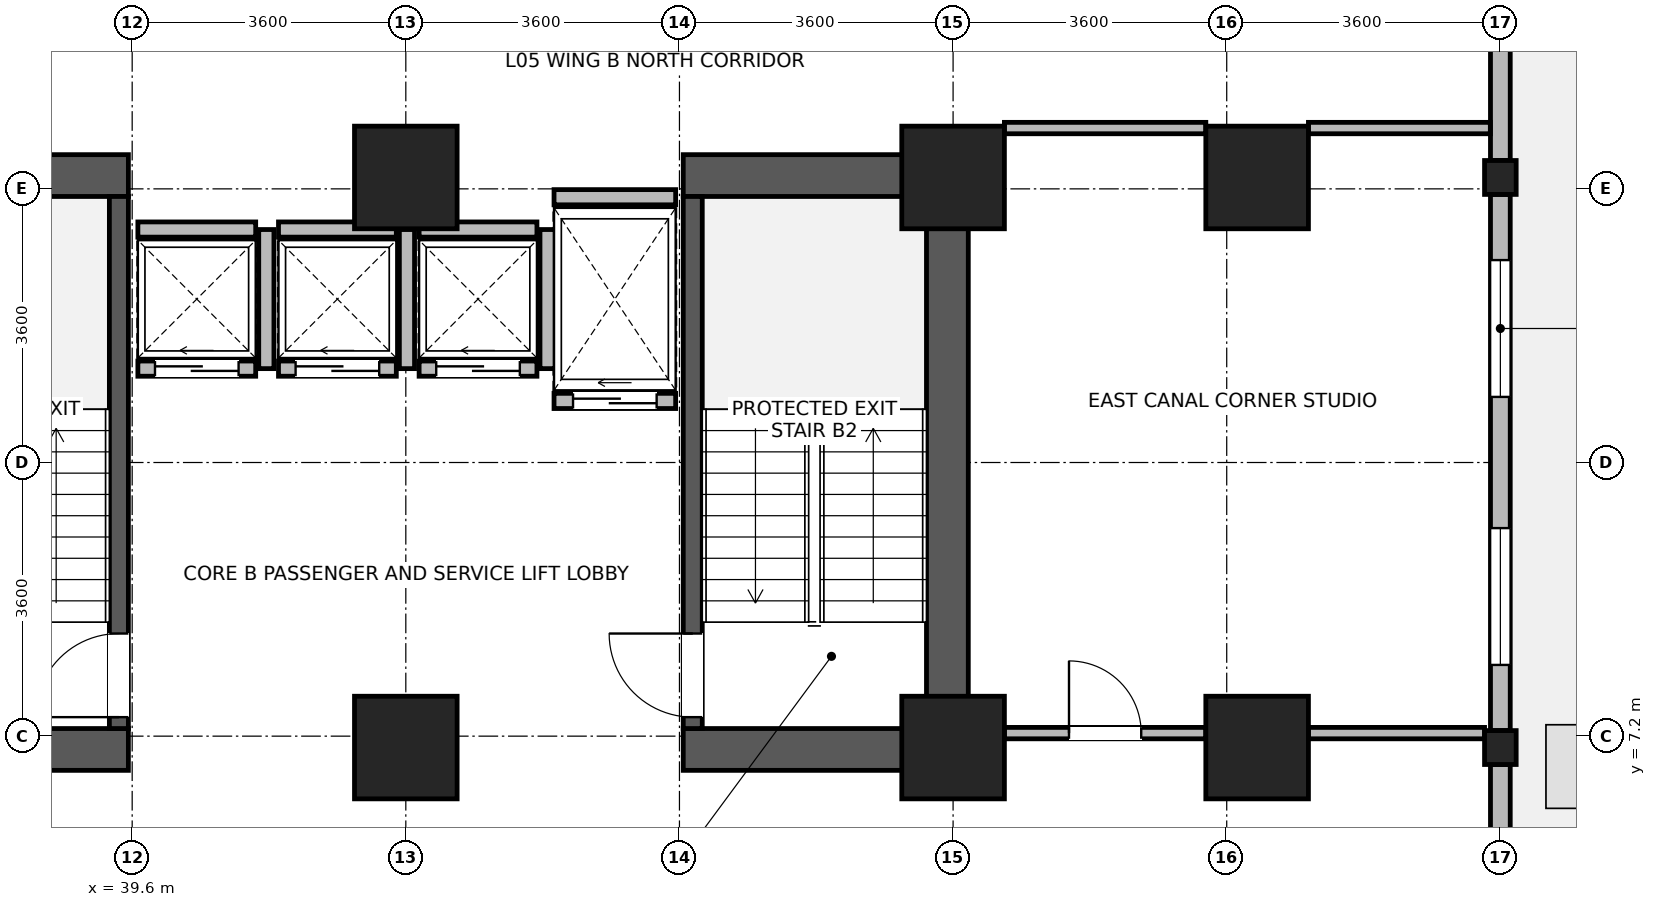
"""IFC4 building model, lengths in metres.
Left out: names, types, materials, properties, quantities, classifications, styles, units other than length and angle.
Written with IfcOpenShell. Run it as: python <this file> out.ifc"""

import sys

from ifc_helpers import new_model, si_unit, direction, frame, frame_2d, origin, origin_2d, place, context, subcontext, project, spatial, rectangle, i_section, extrude, source, transform, mapped, element, fill, save


model = new_model("IFC4")
c1 = context("Model", 3, precision=1e-05, world=origin(), true_north=direction((0.0, 1.0)))
c2 = subcontext(c1, "Body", "Model", "MODEL_VIEW")
j1 = project(units=[si_unit("LENGTHUNIT", "METRE"), si_unit("PLANEANGLEUNIT", "RADIAN")], contexts=[c1])
p1 = place(None, origin())
s1 = spatial("IfcSite", under=j1, at=p1, CompositionType="ELEMENT")
p2 = place(p1, origin())
s2 = spatial("IfcBuilding", under=s1, at=p2, CompositionType="ELEMENT")
p3 = place(p2, frame((0.0, 0.0, 25.3)))
s3 = spatial("IfcBuildingStorey", under=s2, at=p3, CompositionType="ELEMENT", Elevation=25.3)
p4 = place(p3, frame((50.325, 6.75, 0.0), z_axis=(0.0, 0.0, 1.0), x_axis=(0.0, 1.0, 0.0)))
e1 = element("IfcWall", 1, at=p4, inside=s3, PredefinedType="SHEAR", context=c2, shape_type="SweptSolid", body=[
    extrude(rectangle(XDim=8.1, YDim=0.55, at=frame_2d((4.05, 0.0))), origin(), (0.0, 0.0, 1.0), 3.45),
])
for number, where, z_axis, x_axis in (
    (2, (36.35, 7.025, 0.0), (0.0, 0.0, 1.0), (1.0, 0.0, 0.0)),
    (3, (46.85, 7.025, 0.0), (0.0, 0.0, 1.0), (1.0, 0.0, 0.0)),
    (4, (36.35, 14.575, 0.0), (0.0, 0.0, 1.0), (1.0, 0.0, 0.0)),
    (5, (46.85, 14.575, 0.0), (0.0, 0.0, 1.0), (1.0, 0.0, 0.0)),
):
    element("IfcWall", number, at=place(p3, frame(where, z_axis=z_axis, x_axis=x_axis)), inside=s3, PredefinedType="SHEAR", context=c2, shape_type="SweptSolid", body=[
        extrude(rectangle(XDim=3.2, YDim=0.55, at=frame_2d((1.6, 0.0))), origin(), (0.0, 0.0, 1.0), 3.45),
    ])
p5 = place(p3, frame((39.425, 7.3, 0.0), z_axis=(0.0, 0.0, 1.0), x_axis=(0.0, 1.0, 0.0)))
e6 = element("IfcWall", 6, at=p5, inside=s3, PredefinedType="SHEAR", context=c2, shape_type="SweptSolid", body=[
    extrude(rectangle(XDim=7.0, YDim=0.25, at=frame_2d((3.5, 0.0))), origin(), (0.0, 0.0, 1.0), 3.45),
])
p6 = place(p5, frame((0.15, 0.0, 0.0)))
e7 = element("IfcOpeningElement", 7, at=p6, cuts=e6, PredefinedType="OPENING", context=c2, shape_type="SweptSolid", body=[
    extrude(rectangle(XDim=1.1, YDim=2.08, at=frame_2d((0.55, 1.04))), frame((0.0, 0.135, 0.0), z_axis=(0.0, -1.0, 0.0), x_axis=(1.0, 0.0, 0.0)), (0.0, 0.0, 1.0), 0.27),
])
p7 = place(p3, frame((46.975, 7.3, 0.0), z_axis=(0.0, 0.0, 1.0), x_axis=(0.0, 1.0, 0.0)))
e8 = element("IfcWall", 8, at=p7, inside=s3, PredefinedType="SHEAR", context=c2, shape_type="SweptSolid", body=[
    extrude(rectangle(XDim=7.0, YDim=0.25, at=frame_2d((3.5, 0.0))), origin(), (0.0, 0.0, 1.0), 3.45),
])
p8 = place(p7, frame((0.15, 0.0, 0.0)))
e9 = element("IfcOpeningElement", 9, at=p8, cuts=e8, PredefinedType="OPENING", context=c2, shape_type="SweptSolid", body=[
    extrude(rectangle(XDim=1.1, YDim=2.08, at=frame_2d((0.55, 1.04))), frame((0.0, 0.135, 0.0), z_axis=(0.0, -1.0, 0.0), x_axis=(1.0, 0.0, 0.0)), (0.0, 0.0, 1.0), 0.27),
])
m1 = source(origin(), c2, "Body", "SweptSolid", [
    extrude(rectangle(XDim=1.35, YDim=1.35, at=origin_2d()), origin(), (0.0, 0.0, 1.0), 3.7),
])
for number, where, z_axis, x_axis in (
    (10, (43.2, 7.05, 0.0), (0.0, 0.0, 1.0), (1.0, 0.0, 0.0)),
    (11, (43.2, 14.55, 0.0), (0.0, 0.0, 1.0), (1.0, 0.0, 0.0)),
    (12, (50.4, 7.05, 0.0), (0.0, 0.0, 1.0), (1.0, 0.0, 0.0)),
    (13, (50.4, 14.55, 0.0), (0.0, 0.0, 1.0), (1.0, 0.0, 0.0)),
    (14, (54.4, 7.05, 0.0), (0.0, 0.0, 1.0), (1.0, 0.0, 0.0)),
    (15, (54.4, 14.55, 0.0), (0.0, 0.0, 1.0), (1.0, 0.0, 0.0)),
):
    element("IfcColumn", number, at=place(p3, frame(where, z_axis=z_axis, x_axis=x_axis)), inside=s3, PredefinedType="COLUMN", context=c2, shape_type="MappedRepresentation", body=[
        mapped(m1, transform((0.0, 0.0, 0.0), x_axis=(1.0, 0.0, 0.0), y_axis=(0.0, 1.0, 0.0), z_axis=(0.0, 0.0, 1.0), scale=1.0)),
    ])
m2 = source(origin(), c2, "Body", "SweptSolid", [
    extrude(i_section(OverallWidth=0.416, OverallDepth=0.446, WebThickness=0.029, FlangeThickness=0.04, FilletRadius=0.015, at=origin_2d()), origin(), (0.0, 0.0, 1.0), 3.7),
])
for number, where, z_axis, x_axis in (
    (16, (57.6, 7.05, 0.0), (0.0, 0.0, 1.0), (1.0, 0.0, 0.0)),
    (17, (57.6, 14.55, 0.0), (0.0, 0.0, 1.0), (1.0, 0.0, 0.0)),
):
    element("IfcColumn", number, at=place(p3, frame(where, z_axis=z_axis, x_axis=x_axis)), inside=s3, PredefinedType="COLUMN", context=c2, shape_type="MappedRepresentation", body=[
        mapped(m2, transform((0.0, 0.0, 0.0), x_axis=(1.0, 0.0, 0.0), y_axis=(0.0, 1.0, 0.0), z_axis=(0.0, 0.0, 1.0), scale=1.0)),
    ])
p9 = place(p3, frame((57.6, 6.826, 0.0), z_axis=(0.0, 0.0, 1.0), x_axis=(0.0, -1.0, 0.0)))
e18 = element("IfcWall", 18, at=p9, inside=s3, PredefinedType="STANDARD", context=c2, shape_type="SweptSolid", body=[
    extrude(rectangle(XDim=5.156, YDim=0.26, at=frame_2d((2.578, 0.0))), origin(), (0.0, 0.0, 1.0), 3.43),
])
p10 = place(p9, frame((2.859, 0.0, 0.0)))
e19 = element("IfcOpeningElement", 19, at=p10, cuts=e18, PredefinedType="OPENING", context=c2, shape_type="SweptSolid", body=[
    extrude(rectangle(XDim=1.5, YDim=2.15, at=frame_2d((0.75, 1.075))), frame((0.0, 0.14, 0.0), z_axis=(0.0, -1.0, 0.0), x_axis=(1.0, 0.0, 0.0)), (0.0, 0.0, 1.0), 0.28),
])
p11 = place(p3, frame((57.6, 14.326, 0.0), z_axis=(0.0, 0.0, 1.0), x_axis=(0.0, -1.0, 0.0)))
e20 = element("IfcWall", 20, at=p11, inside=s3, PredefinedType="STANDARD", context=c2, shape_type="SweptSolid", body=[
    extrude(rectangle(XDim=7.052, YDim=0.26, at=frame_2d((3.526, 0.0))), origin(), (0.0, 0.0, 1.0), 2.93),
])
p12 = place(p11, frame((0.863, 0.0, 0.85)))
e21 = element("IfcOpeningElement", 21, at=p12, cuts=e20, PredefinedType="OPENING", context=c2, shape_type="SweptSolid", body=[
    extrude(rectangle(XDim=1.8, YDim=1.85, at=frame_2d((0.9, 0.925))), frame((0.0, 0.14, 0.0), z_axis=(0.0, -1.0, 0.0), x_axis=(1.0, 0.0, 0.0)), (0.0, 0.0, 1.0), 0.28),
])
p13 = place(p11, frame((4.389, 0.0, 0.85)))
e22 = element("IfcOpeningElement", 22, at=p13, cuts=e20, PredefinedType="OPENING", context=c2, shape_type="SweptSolid", body=[
    extrude(rectangle(XDim=1.8, YDim=1.85, at=frame_2d((0.9, 0.925))), frame((0.0, 0.14, 0.0), z_axis=(0.0, -1.0, 0.0), x_axis=(1.0, 0.0, 0.0)), (0.0, 0.0, 1.0), 0.28),
])
p14 = place(p3, frame((57.6, 21.376, 0.0), z_axis=(0.0, 0.0, 1.0), x_axis=(0.0, -1.0, 0.0)))
e23 = element("IfcWall", 23, at=p14, inside=s3, PredefinedType="STANDARD", context=c2, shape_type="SweptSolid", body=[
    extrude(rectangle(XDim=6.602, YDim=0.26, at=frame_2d((3.301, 0.0))), origin(), (0.0, 0.0, 1.0), 2.93),
])
p15 = place(p14, frame((0.75, 0.0, 0.85)))
e24 = element("IfcOpeningElement", 24, at=p15, cuts=e23, PredefinedType="OPENING", context=c2, shape_type="SweptSolid", body=[
    extrude(rectangle(XDim=1.8, YDim=1.85, at=frame_2d((0.9, 0.925))), frame((0.0, 0.14, 0.0), z_axis=(0.0, -1.0, 0.0), x_axis=(1.0, 0.0, 0.0)), (0.0, 0.0, 1.0), 0.28),
])
p16 = place(p3, frame((39.675, 12.035, 0.0), z_axis=(0.0, 0.0, 1.0), x_axis=(1.0, 0.0, 0.0)))
e25 = element("IfcWall", 25, at=p16, inside=s3, PredefinedType="PARTITIONING", context=c2, shape_type="SweptSolid", body=[
    extrude(rectangle(XDim=1.55, YDim=0.2, at=frame_2d((0.775, 0.0))), origin(), (0.0, 0.0, 1.0), 3.43),
])
p17 = place(p16, frame((0.225, 0.0, 0.0)))
e26 = element("IfcOpeningElement", 26, at=p17, cuts=e25, PredefinedType="OPENING", context=c2, shape_type="SweptSolid", body=[
    extrude(rectangle(XDim=1.1, YDim=2.12, at=frame_2d((0.55, 1.06))), frame((0.0, 0.11, 0.0), z_axis=(0.0, -1.0, 0.0), x_axis=(1.0, 0.0, 0.0)), (0.0, 0.0, 1.0), 0.22),
])
p18 = place(p3, frame((39.675, 13.865, 0.0), z_axis=(0.0, 0.0, 1.0), x_axis=(1.0, 0.0, 0.0)))
e27 = element("IfcWall", 27, at=p18, inside=s3, PredefinedType="PARTITIONING", context=c2, shape_type="SweptSolid", body=[
    extrude(rectangle(XDim=1.55, YDim=0.2, at=frame_2d((0.775, 0.0))), origin(), (0.0, 0.0, 1.0), 3.43),
])
p19 = place(p3, frame((41.365, 12.035, 0.0), z_axis=(0.0, 0.0, 1.0), x_axis=(0.0, 1.0, 0.0)))
e28 = element("IfcWall", 28, at=p19, inside=s3, PredefinedType="PARTITIONING", context=c2, shape_type="SweptSolid", body=[
    extrude(rectangle(XDim=1.83, YDim=0.2, at=frame_2d((0.915, 0.0))), origin(), (0.0, 0.0, 1.0), 3.43),
])
p20 = place(p3, frame((41.525, 12.035, 0.0), z_axis=(0.0, 0.0, 1.0), x_axis=(1.0, 0.0, 0.0)))
e29 = element("IfcWall", 29, at=p20, inside=s3, PredefinedType="PARTITIONING", context=c2, shape_type="SweptSolid", body=[
    extrude(rectangle(XDim=1.55, YDim=0.2, at=frame_2d((0.775, 0.0))), origin(), (0.0, 0.0, 1.0), 3.43),
])
p21 = place(p20, frame((0.225, 0.0, 0.0)))
e30 = element("IfcOpeningElement", 30, at=p21, cuts=e29, PredefinedType="OPENING", context=c2, shape_type="SweptSolid", body=[
    extrude(rectangle(XDim=1.1, YDim=2.12, at=frame_2d((0.55, 1.06))), frame((0.0, 0.11, 0.0), z_axis=(0.0, -1.0, 0.0), x_axis=(1.0, 0.0, 0.0)), (0.0, 0.0, 1.0), 0.22),
])
p22 = place(p3, frame((41.525, 13.865, 0.0), z_axis=(0.0, 0.0, 1.0), x_axis=(1.0, 0.0, 0.0)))
e31 = element("IfcWall", 31, at=p22, inside=s3, PredefinedType="PARTITIONING", context=c2, shape_type="SweptSolid", body=[
    extrude(rectangle(XDim=1.55, YDim=0.2, at=frame_2d((0.775, 0.0))), origin(), (0.0, 0.0, 1.0), 3.43),
])
p23 = place(p3, frame((43.215, 12.035, 0.0), z_axis=(0.0, 0.0, 1.0), x_axis=(0.0, 1.0, 0.0)))
e32 = element("IfcWall", 32, at=p23, inside=s3, PredefinedType="PARTITIONING", context=c2, shape_type="SweptSolid", body=[
    extrude(rectangle(XDim=1.83, YDim=0.2, at=frame_2d((0.915, 0.0))), origin(), (0.0, 0.0, 1.0), 3.43),
])
p24 = place(p3, frame((43.375, 12.035, 0.0), z_axis=(0.0, 0.0, 1.0), x_axis=(1.0, 0.0, 0.0)))
e33 = element("IfcWall", 33, at=p24, inside=s3, PredefinedType="PARTITIONING", context=c2, shape_type="SweptSolid", body=[
    extrude(rectangle(XDim=1.55, YDim=0.2, at=frame_2d((0.775, 0.0))), origin(), (0.0, 0.0, 1.0), 3.43),
])
p25 = place(p24, frame((0.225, 0.0, 0.0)))
e34 = element("IfcOpeningElement", 34, at=p25, cuts=e33, PredefinedType="OPENING", context=c2, shape_type="SweptSolid", body=[
    extrude(rectangle(XDim=1.1, YDim=2.12, at=frame_2d((0.55, 1.06))), frame((0.0, 0.11, 0.0), z_axis=(0.0, -1.0, 0.0), x_axis=(1.0, 0.0, 0.0)), (0.0, 0.0, 1.0), 0.22),
])
p26 = place(p3, frame((43.375, 13.865, 0.0), z_axis=(0.0, 0.0, 1.0), x_axis=(1.0, 0.0, 0.0)))
e35 = element("IfcWall", 35, at=p26, inside=s3, PredefinedType="PARTITIONING", context=c2, shape_type="SweptSolid", body=[
    extrude(rectangle(XDim=1.55, YDim=0.2, at=frame_2d((0.775, 0.0))), origin(), (0.0, 0.0, 1.0), 3.43),
])
p27 = place(p3, frame((45.065, 12.035, 0.0), z_axis=(0.0, 0.0, 1.0), x_axis=(0.0, 1.0, 0.0)))
e36 = element("IfcWall", 36, at=p27, inside=s3, PredefinedType="PARTITIONING", context=c2, shape_type="SweptSolid", body=[
    extrude(rectangle(XDim=1.83, YDim=0.2, at=frame_2d((0.915, 0.0))), origin(), (0.0, 0.0, 1.0), 3.43),
])
p28 = place(p3, frame((45.15, 11.61, 0.0), z_axis=(0.0, 0.0, 1.0), x_axis=(1.0, 0.0, 0.0)))
e37 = element("IfcWall", 37, at=p28, inside=s3, PredefinedType="PARTITIONING", context=c2, shape_type="SweptSolid", body=[
    extrude(rectangle(XDim=1.6, YDim=0.2, at=frame_2d((0.8, 0.0))), origin(), (0.0, 0.0, 1.0), 3.43),
])
p29 = place(p28, frame((0.25, 0.0, 0.0)))
e38 = element("IfcOpeningElement", 38, at=p29, cuts=e37, PredefinedType="OPENING", context=c2, shape_type="SweptSolid", body=[
    extrude(rectangle(XDim=1.1, YDim=2.12, at=frame_2d((0.55, 1.06))), frame((0.0, 0.11, 0.0), z_axis=(0.0, -1.0, 0.0), x_axis=(1.0, 0.0, 0.0)), (0.0, 0.0, 1.0), 0.22),
])
p30 = place(p3, frame((45.15, 14.29, 0.0), z_axis=(0.0, 0.0, 1.0), x_axis=(1.0, 0.0, 0.0)))
e39 = element("IfcWall", 39, at=p30, inside=s3, PredefinedType="PARTITIONING", context=c2, shape_type="SweptSolid", body=[
    extrude(rectangle(XDim=1.6, YDim=0.2, at=frame_2d((0.8, 0.0))), origin(), (0.0, 0.0, 1.0), 2.23),
])
p31 = place(p3, frame((51.075, 7.24, 0.0), z_axis=(0.0, 0.0, 1.0), x_axis=(1.0, 0.0, 0.0)))
e40 = element("IfcWall", 40, at=p31, inside=s3, PredefinedType="PARTITIONING", context=c2, shape_type="SweptSolid", body=[
    extrude(rectangle(XDim=2.65, YDim=0.15, at=frame_2d((1.325, 0.0))), origin(), (0.0, 0.0, 1.0), 2.78),
])
p32 = place(p31, frame((0.85, 0.0, 0.0)))
e41 = element("IfcOpeningElement", 41, at=p32, cuts=e40, PredefinedType="OPENING", context=c2, shape_type="SweptSolid", body=[
    extrude(rectangle(XDim=0.95, YDim=2.1, at=frame_2d((0.475, 1.05))), frame((0.0, 0.085, 0.0), z_axis=(0.0, -1.0, 0.0), x_axis=(1.0, 0.0, 0.0)), (0.0, 0.0, 1.0), 0.17),
])
p33 = place(p3, frame((55.075, 7.24, 0.0), z_axis=(0.0, 0.0, 1.0), x_axis=(1.0, 0.0, 0.0)))
e42 = element("IfcWall", 42, at=p33, inside=s3, PredefinedType="PARTITIONING", context=c2, shape_type="SweptSolid", body=[
    extrude(rectangle(XDim=2.317, YDim=0.15, at=frame_2d((1.159, 0.0))), origin(), (0.0, 0.0, 1.0), 2.78),
])
p34 = place(p3, frame((51.075, 15.2, 0.0), z_axis=(0.0, 0.0, 1.0), x_axis=(1.0, 0.0, 0.0)))
e43 = element("IfcWall", 43, at=p34, inside=s3, PredefinedType="PARTITIONING", context=c2, shape_type="SweptSolid", body=[
    extrude(rectangle(XDim=2.65, YDim=0.15, at=frame_2d((1.325, 0.0))), origin(), (0.0, 0.0, 1.0), 3.43),
])
p35 = place(p3, frame((55.075, 15.2, 0.0), z_axis=(0.0, 0.0, 1.0), x_axis=(1.0, 0.0, 0.0)))
e44 = element("IfcWall", 44, at=p35, inside=s3, PredefinedType="PARTITIONING", context=c2, shape_type="SweptSolid", body=[
    extrude(rectangle(XDim=2.393, YDim=0.15, at=frame_2d((1.197, 0.0))), origin(), (0.0, 0.0, 1.0), 3.43),
])
p36 = place(p12, origin())
e45 = element("IfcWindow", 45, at=p36, inside=s3, PartitioningType="SINGLE_PANEL", PredefinedType="WINDOW", context=c2, shape_type="SweptSolid", body=[
    extrude(rectangle(XDim=1.8, YDim=1.85, at=frame_2d((0.9, 0.925))), frame((0.0, 0.03, 0.0), z_axis=(0.0, -1.0, 0.0), x_axis=(1.0, 0.0, 0.0)), (0.0, 0.0, 1.0), 0.06),
])
fill(e21, e45)
p37 = place(p13, origin())
e46 = element("IfcWindow", 46, at=p37, inside=s3, PartitioningType="SINGLE_PANEL", PredefinedType="WINDOW", context=c2, shape_type="SweptSolid", body=[
    extrude(rectangle(XDim=1.8, YDim=1.85, at=frame_2d((0.9, 0.925))), frame((0.0, 0.03, 0.0), z_axis=(0.0, -1.0, 0.0), x_axis=(1.0, 0.0, 0.0)), (0.0, 0.0, 1.0), 0.06),
])
fill(e22, e46)
p38 = place(p6, origin())
e47 = element("IfcDoor", 47, at=p38, inside=s3, OperationType="SINGLE_SWING_LEFT", PredefinedType="DOOR", context=c2, shape_type="SweptSolid", body=[
    extrude(rectangle(XDim=1.1, YDim=2.08, at=frame_2d((0.55, 1.04))), frame((0.0, 0.025, 0.0), z_axis=(0.0, -1.0, 0.0), x_axis=(1.0, 0.0, 0.0)), (0.0, 0.0, 1.0), 0.05),
])
fill(e7, e47)
p39 = place(p8, origin())
e48 = element("IfcDoor", 48, at=p39, inside=s3, OperationType="SINGLE_SWING_RIGHT", PredefinedType="DOOR", context=c2, shape_type="SweptSolid", body=[
    extrude(rectangle(XDim=1.1, YDim=2.08, at=frame_2d((0.55, 1.04))), frame((0.0, 0.025, 0.0), z_axis=(0.0, -1.0, 0.0), x_axis=(1.0, 0.0, 0.0)), (0.0, 0.0, 1.0), 0.05),
])
fill(e9, e48)
p40 = place(p17, origin())
e49 = element("IfcDoor", 49, at=p40, inside=s3, OperationType="SLIDING_TO_LEFT", PredefinedType="DOOR", context=c2, shape_type="SweptSolid", body=[
    extrude(rectangle(XDim=1.1, YDim=2.12, at=frame_2d((0.55, 1.06))), frame((0.0, 0.025, 0.0), z_axis=(0.0, -1.0, 0.0), x_axis=(1.0, 0.0, 0.0)), (0.0, 0.0, 1.0), 0.05),
])
fill(e26, e49)
p41 = place(p21, origin())
e50 = element("IfcDoor", 50, at=p41, inside=s3, OperationType="SLIDING_TO_LEFT", PredefinedType="DOOR", context=c2, shape_type="SweptSolid", body=[
    extrude(rectangle(XDim=1.1, YDim=2.12, at=frame_2d((0.55, 1.06))), frame((0.0, 0.025, 0.0), z_axis=(0.0, -1.0, 0.0), x_axis=(1.0, 0.0, 0.0)), (0.0, 0.0, 1.0), 0.05),
])
fill(e30, e50)
p42 = place(p25, origin())
e51 = element("IfcDoor", 51, at=p42, inside=s3, OperationType="SLIDING_TO_LEFT", PredefinedType="DOOR", context=c2, shape_type="SweptSolid", body=[
    extrude(rectangle(XDim=1.1, YDim=2.12, at=frame_2d((0.55, 1.06))), frame((0.0, 0.025, 0.0), z_axis=(0.0, -1.0, 0.0), x_axis=(1.0, 0.0, 0.0)), (0.0, 0.0, 1.0), 0.05),
])
fill(e34, e51)
p43 = place(p29, origin())
e52 = element("IfcDoor", 52, at=p43, inside=s3, OperationType="SLIDING_TO_LEFT", PredefinedType="DOOR", context=c2, shape_type="SweptSolid", body=[
    extrude(rectangle(XDim=1.1, YDim=2.12, at=frame_2d((0.55, 1.06))), frame((0.0, 0.025, 0.0), z_axis=(0.0, -1.0, 0.0), x_axis=(1.0, 0.0, 0.0)), (0.0, 0.0, 1.0), 0.05),
])
fill(e38, e52)
p44 = place(p32, origin())
e53 = element("IfcDoor", 53, at=p44, inside=s3, OperationType="SINGLE_SWING_LEFT", PredefinedType="DOOR", context=c2, shape_type="SweptSolid", body=[
    extrude(rectangle(XDim=0.95, YDim=2.1, at=frame_2d((0.475, 1.05))), frame((0.0, 0.025, 0.0), z_axis=(0.0, -1.0, 0.0), x_axis=(1.0, 0.0, 0.0)), (0.0, 0.0, 1.0), 0.05),
])
fill(e41, e53)
save(model, sys.argv[1])
